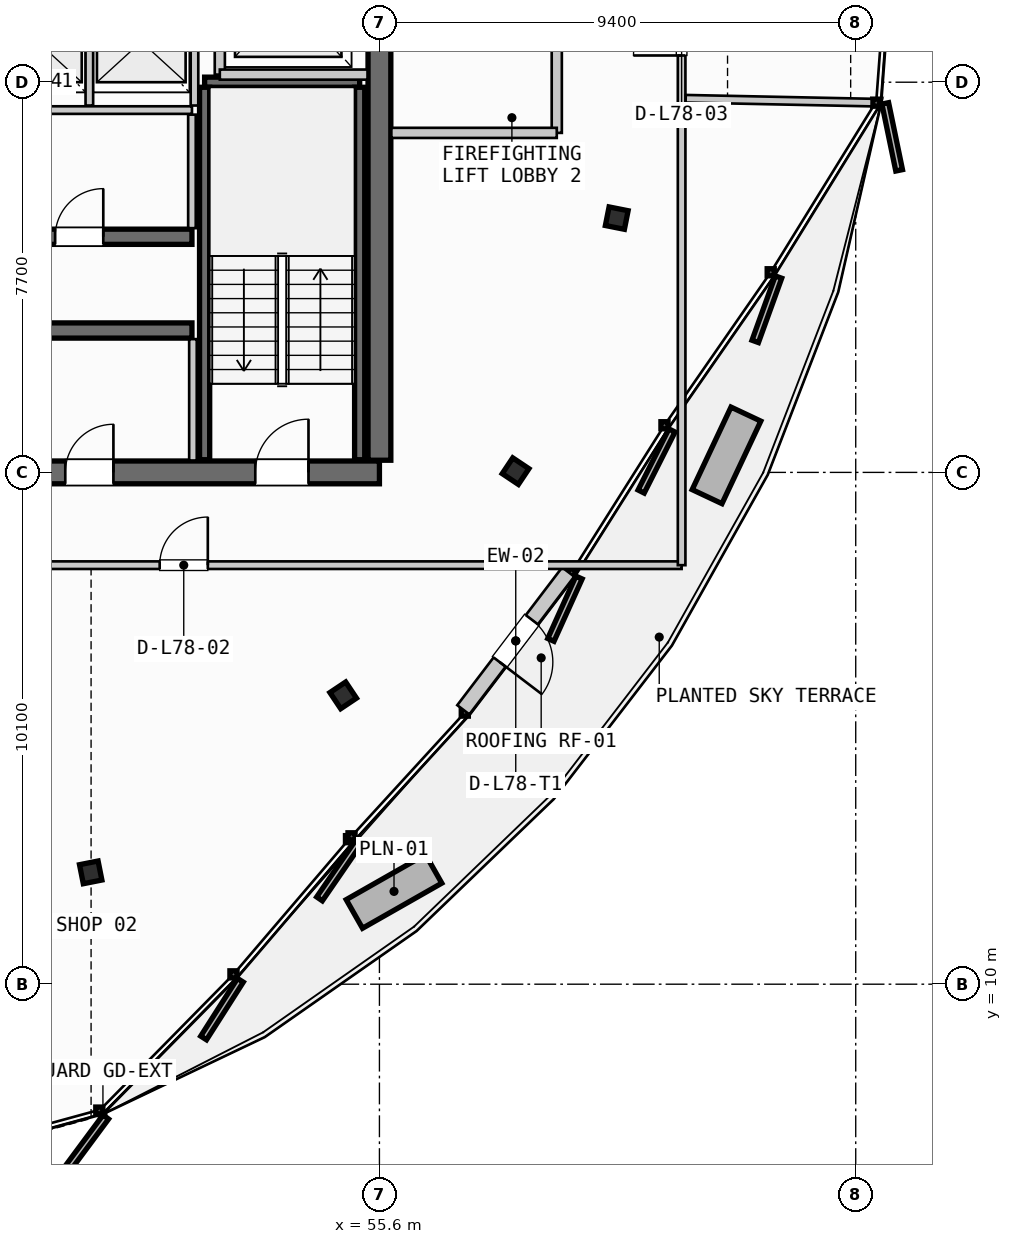
"""IFC4 building model, lengths in metres.
Left out: names, types, materials, properties, quantities, classifications, styles, units other than length and angle.
Written with IfcOpenShell. Run it as: python <this file> out.ifc"""

import sys

from ifc_helpers import new_model, si_unit, direction, frame, frame_2d, origin, origin_2d, place, context, subcontext, project, spatial, rectangle, i_section, extrude, source, transform, mapped, element, fill, save


model = new_model("IFC4")
c1 = context("Model", 3, precision=1e-05, world=origin(), true_north=direction((0.0, 1.0)))
c2 = subcontext(c1, "Body", "Model", "MODEL_VIEW")
j1 = project(units=[si_unit("LENGTHUNIT", "METRE"), si_unit("PLANEANGLEUNIT", "RADIAN")], contexts=[c1])
p1 = place(None, origin())
s1 = spatial("IfcSite", under=j1, at=p1, CompositionType="ELEMENT")
p2 = place(p1, origin())
s2 = spatial("IfcBuilding", under=s1, at=p2, CompositionType="ELEMENT")
p3 = place(p2, frame((0.0, 0.0, 293.95)))
s3 = spatial("IfcBuildingStorey", under=s2, at=p3, CompositionType="ELEMENT", Elevation=293.95)
p4 = place(p3, frame((38.0, 20.1, 0.0), z_axis=(0.0, 0.0, 1.0), x_axis=(1.0, 0.0, 0.0)))
e1 = element("IfcWall", 1, at=p4, inside=s3, PredefinedType="SHEAR", context=c2, shape_type="SweptSolid", body=[
    extrude(rectangle(XDim=17.6, YDim=0.45, at=frame_2d((8.8, 0.0))), origin(), (0.0, 0.0, 1.0), 3.21),
])
p5 = place(p4, frame((1.4, 0.0, 0.0)))
e2 = element("IfcOpeningElement", 2, at=p5, cuts=e1, PredefinedType="OPENING", context=c2, shape_type="SweptSolid", body=[
    extrude(rectangle(XDim=1.05, YDim=2.15, at=frame_2d((0.525, 1.075))), frame((0.0, 0.235, 0.0), z_axis=(0.0, -1.0, 0.0), x_axis=(1.0, 0.0, 0.0)), (0.0, 0.0, 1.0), 0.47),
])
p6 = place(p4, frame((15.15, 0.0, 0.0)))
e3 = element("IfcOpeningElement", 3, at=p6, cuts=e1, PredefinedType="OPENING", context=c2, shape_type="SweptSolid", body=[
    extrude(rectangle(XDim=1.05, YDim=2.15, at=frame_2d((0.525, 1.075))), frame((0.0, 0.235, 0.0), z_axis=(0.0, -1.0, 0.0), x_axis=(1.0, 0.0, 0.0)), (0.0, 0.0, 1.0), 0.47),
])
p7 = place(p4, frame((5.25, 0.0, 0.0)))
e4 = element("IfcOpeningElement", 4, at=p7, cuts=e1, PredefinedType="OPENING", context=c2, shape_type="SweptSolid", body=[
    extrude(rectangle(XDim=0.95, YDim=2.15, at=frame_2d((0.475, 1.075))), frame((0.0, 0.235, 0.0), z_axis=(0.0, -1.0, 0.0), x_axis=(1.0, 0.0, 0.0)), (0.0, 0.0, 1.0), 0.47),
])
p8 = place(p4, frame((11.4, 0.0, 0.0)))
e5 = element("IfcOpeningElement", 5, at=p8, cuts=e1, PredefinedType="OPENING", context=c2, shape_type="SweptSolid", body=[
    extrude(rectangle(XDim=0.95, YDim=2.15, at=frame_2d((0.475, 1.075))), frame((0.0, 0.235, 0.0), z_axis=(0.0, -1.0, 0.0), x_axis=(1.0, 0.0, 0.0)), (0.0, 0.0, 1.0), 0.47),
])
p9 = place(p3, frame((55.6, 20.34, 0.0), z_axis=(0.0, 0.0, 1.0), x_axis=(0.0, 1.0, 0.0)))
e6 = element("IfcWall", 6, at=p9, inside=s3, PredefinedType="SHEAR", context=c2, shape_type="SweptSolid", body=[
    extrude(rectangle(XDim=14.92, YDim=0.45, at=frame_2d((7.46, 0.0))), origin(), (0.0, 0.0, 1.0), 3.21),
])
p10 = place(p9, frame((12.71, 0.0, 0.0)))
e7 = element("IfcOpeningElement", 7, at=p10, cuts=e6, PredefinedType="OPENING", context=c2, shape_type="SweptSolid", body=[
    extrude(rectangle(XDim=1.05, YDim=2.15, at=frame_2d((0.525, 1.075))), frame((0.0, 0.235, 0.0), z_axis=(0.0, -1.0, 0.0), x_axis=(1.0, 0.0, 0.0)), (0.0, 0.0, 1.0), 0.47),
])
p11 = place(p9, frame((8.61, 0.0, 0.0)))
e8 = element("IfcOpeningElement", 8, at=p11, cuts=e6, PredefinedType="OPENING", context=c2, shape_type="SweptSolid", body=[
    extrude(rectangle(XDim=1.1, YDim=2.2, at=frame_2d((0.55, 1.1))), frame((0.0, 0.235, 0.0), z_axis=(0.0, -1.0, 0.0), x_axis=(1.0, 0.0, 0.0)), (0.0, 0.0, 1.0), 0.47),
])
p12 = place(p3, frame((47.65, 22.9, 0.0), z_axis=(0.0, 0.0, 1.0), x_axis=(1.0, 0.0, 0.0)))
e9 = element("IfcWall", 9, at=p12, inside=s3, PredefinedType="SHEAR", context=c2, shape_type="SweptSolid", body=[
    extrude(rectangle(XDim=4.25, YDim=0.3, at=frame_2d((2.125, 0.0))), origin(), (0.0, 0.0, 1.0), 3.21),
])
p13 = place(p3, frame((47.65, 24.75, 0.0), z_axis=(0.0, 0.0, 1.0), x_axis=(1.0, 0.0, 0.0)))
e10 = element("IfcWall", 10, at=p13, inside=s3, PredefinedType="SHEAR", context=c2, shape_type="SweptSolid", body=[
    extrude(rectangle(XDim=4.25, YDim=0.3, at=frame_2d((2.125, 0.0))), origin(), (0.0, 0.0, 1.0), 3.21),
])
p14 = place(p13, frame((1.55, 0.0, 0.0)))
e11 = element("IfcOpeningElement", 11, at=p14, cuts=e10, PredefinedType="OPENING", context=c2, shape_type="SweptSolid", body=[
    extrude(rectangle(XDim=0.95, YDim=2.15, at=frame_2d((0.475, 1.075))), frame((0.0, 0.16, 0.0), z_axis=(0.0, -1.0, 0.0), x_axis=(1.0, 0.0, 0.0)), (0.0, 0.0, 1.0), 0.32),
])
m1 = source(origin(), c2, "Body", "SweptSolid", [
    extrude(i_section(OverallWidth=0.374, OverallDepth=0.383, WebThickness=0.017, FlangeThickness=0.026, FilletRadius=0.015, at=origin_2d()), origin(), (0.0, 0.0, 1.0), 3.21),
])
for number, where, z_axis, x_axis in (
    (12, (49.902, 12.207, 0.0), (0.0, 0.0, 1.0), (0.195, -0.981, 0.0)),
    (13, (54.885, 15.7, 0.0), (0.0, 0.0, 1.0), (0.556, -0.831, 0.0)),
    (14, (58.287, 20.125, 0.0), (0.0, 0.0, 1.0), (0.831, -0.556, 0.0)),
    (15, (60.284, 25.118, 0.0), (0.0, 0.0, 1.0), (0.981, -0.195, 0.0)),
):
    element("IfcColumn", number, at=place(p3, frame(where, z_axis=z_axis, x_axis=x_axis)), inside=s3, PredefinedType="COLUMN", context=c2, shape_type="MappedRepresentation", body=[
        mapped(m1, transform((0.0, 0.0, 0.0), scale=1.0)),
    ])
p15 = place(p3, frame((59.325, 18.135, 0.0), z_axis=(0.0, 0.0, 1.0), x_axis=(-0.605586755282, -0.795779292158, 0.0)))
e16 = element("IfcWall", 16, at=p15, inside=s3, PredefinedType="SOLIDWALL", context=c2, shape_type="SweptSolid", body=[
    extrude(rectangle(XDim=3.417, YDim=0.3, at=frame_2d((1.708, 0.0))), origin(), (0.0, 0.0, 1.0), 2.735),
])
p16 = place(p15, frame((1.184, 0.0, 0.0)))
e17 = element("IfcOpeningElement", 17, at=p16, cuts=e16, PredefinedType="OPENING", context=c2, shape_type="SweptSolid", body=[
    extrude(rectangle(XDim=1.05, YDim=2.2, at=frame_2d((0.525, 1.1))), frame((0.0, 0.16, 0.0), z_axis=(0.0, -1.0, 0.0), x_axis=(1.0, 0.0, 0.0)), (0.0, 0.0, 1.0), 0.32),
])
p17 = place(p3, frame((52.15, 27.8, 0.0), z_axis=(0.0, 0.0, 1.0), x_axis=(1.0, 0.0, 0.0)))
e18 = element("IfcWall", 18, at=p17, inside=s3, PredefinedType="SHEAR", context=c2, shape_type="SweptSolid", body=[
    extrude(rectangle(XDim=3.06, YDim=0.2, at=frame_2d((1.53, 0.0))), origin(), (0.0, 0.0, 1.0), 3.21),
])
for number, where, z_axis, x_axis in (
    (19, (55.21, 27.7, 0.0), (0.0, 0.0, 1.0), (0.0, -1.0, 0.0)),
    (20, (52.15, 20.35, 0.0), (0.0, 0.0, 1.0), (0.0, 1.0, 0.0)),
):
    element("IfcWall", number, at=place(p3, frame(where, z_axis=z_axis, x_axis=x_axis)), inside=s3, PredefinedType="SHEAR", context=c2, shape_type="SweptSolid", body=[
        extrude(rectangle(XDim=7.35, YDim=0.2, at=frame_2d((3.675, 0.0))), origin(), (0.0, 0.0, 1.0), 3.21),
    ])
p18 = place(p3, frame((52.45, 27.95, 0.0), z_axis=(0.0, 0.0, 1.0), x_axis=(0.0, 1.0, 0.0)))
e21 = element("IfcWall", 21, at=p18, inside=s3, PredefinedType="PARTITIONING", context=c2, shape_type="SweptSolid", body=[
    extrude(rectangle(XDim=3.1, YDim=0.2, at=frame_2d((1.55, 0.0))), origin(), (0.0, 0.0, 1.0), 2.315),
])
p19 = place(p3, frame((52.45, 27.95, 0.0), z_axis=(0.0, 0.0, 1.0), x_axis=(1.0, 0.0, 0.0)))
e22 = element("IfcWall", 22, at=p19, inside=s3, PredefinedType="PARTITIONING", context=c2, shape_type="SweptSolid", body=[
    extrude(rectangle(XDim=2.915, YDim=0.2, at=frame_2d((1.458, 0.0))), origin(), (0.0, 0.0, 1.0), 2.315),
])
p20 = place(p3, frame((59.1, 26.8, 0.0), z_axis=(0.0, 0.0, 1.0), x_axis=(0.0, 1.0, 0.0)))
e23 = element("IfcWall", 23, at=p20, inside=s3, PredefinedType="PARTITIONING", context=c2, shape_type="SweptSolid", body=[
    extrude(rectangle(XDim=4.4, YDim=0.2, at=frame_2d((2.2, 0.0))), origin(), (0.0, 0.0, 1.0), 2.315),
])
p21 = place(p20, frame((1.65, 0.0, 0.0)))
e24 = element("IfcOpeningElement", 24, at=p21, cuts=e23, PredefinedType="OPENING", context=c2, shape_type="SweptSolid", body=[
    extrude(rectangle(XDim=1.05, YDim=2.15, at=frame_2d((0.525, 1.075))), frame((0.0, 0.11, 0.0), z_axis=(0.0, -1.0, 0.0), x_axis=(1.0, 0.0, 0.0)), (0.0, 0.0, 1.0), 0.22),
])
p22 = place(p3, frame((55.835, 26.8, 0.0), z_axis=(0.0, 0.0, 1.0), x_axis=(1.0, 0.0, 0.0)))
e25 = element("IfcWall", 25, at=p22, inside=s3, PredefinedType="PARTITIONING", context=c2, shape_type="SweptSolid", body=[
    extrude(rectangle(XDim=3.265, YDim=0.2, at=frame_2d((1.633, 0.0))), origin(), (0.0, 0.0, 1.0), 2.315),
])
p23 = place(p3, frame((51.92, 20.335, 0.0), z_axis=(0.0, 0.0, 1.0), x_axis=(0.0, 1.0, 0.0)))
e26 = element("IfcWall", 26, at=p23, inside=s3, PredefinedType="PARTITIONING", context=c2, shape_type="SweptSolid", body=[
    extrude(rectangle(XDim=2.395, YDim=0.15, at=frame_2d((1.198, 0.0))), origin(), (0.0, 0.0, 1.0), 2.315),
])
p24 = place(p3, frame((47.65, 27.25, 0.0), z_axis=(0.0, 0.0, 1.0), x_axis=(1.0, 0.0, 0.0)))
e27 = element("IfcWall", 27, at=p24, inside=s3, PredefinedType="PARTITIONING", context=c2, shape_type="SweptSolid", body=[
    extrude(rectangle(XDim=4.25, YDim=0.15, at=frame_2d((2.125, 0.0))), origin(), (0.0, 0.0, 1.0), 2.315),
])
p25 = place(p3, frame((51.9, 24.92, 0.0), z_axis=(0.0, 0.0, 1.0), x_axis=(0.0, 1.0, 0.0)))
e28 = element("IfcWall", 28, at=p25, inside=s3, PredefinedType="PARTITIONING", context=c2, shape_type="SweptSolid", body=[
    extrude(rectangle(XDim=2.24, YDim=0.15, at=frame_2d((1.12, 0.0))), origin(), (0.0, 0.0, 1.0), 2.315),
])
for number, where, z_axis, x_axis in (
    (29, (49.875, 27.34, 0.0), (0.0, 0.0, 1.0), (0.0, 1.0, 0.0)),
    (30, (51.95, 27.34, 0.0), (0.0, 0.0, 1.0), (0.0, 1.0, 0.0)),
):
    element("IfcWall", number, at=place(p3, frame(where, z_axis=z_axis, x_axis=x_axis)), inside=s3, PredefinedType="PARTITIONING", context=c2, shape_type="SweptSolid", body=[
        extrude(rectangle(XDim=2.34, YDim=0.15, at=frame_2d((1.17, 0.0))), origin(), (0.0, 0.0, 1.0), 2.315),
    ])
p26 = place(p3, frame((31.29, 18.269, 0.0), z_axis=(0.0, 0.0, 1.0), x_axis=(1.0, 0.0, 0.0)))
e31 = element("IfcWall", 31, at=p26, inside=s3, PredefinedType="PARTITIONING", context=c2, shape_type="SweptSolid", body=[
    extrude(rectangle(XDim=30.274, YDim=0.15, at=frame_2d((15.137, 0.0))), origin(), (0.0, 0.0, 1.0), 2.315),
])
p27 = place(p26, frame((6.115, 0.0, 0.0)))
e32 = element("IfcOpeningElement", 32, at=p27, cuts=e31, PredefinedType="OPENING", context=c2, shape_type="SweptSolid", body=[
    extrude(rectangle(XDim=0.95, YDim=2.15, at=frame_2d((0.475, 1.075))), frame((0.0, 0.085, 0.0), z_axis=(0.0, -1.0, 0.0), x_axis=(1.0, 0.0, 0.0)), (0.0, 0.0, 1.0), 0.17),
])
p28 = place(p26, frame((19.973, 0.0, 0.0)))
e33 = element("IfcOpeningElement", 33, at=p28, cuts=e31, PredefinedType="OPENING", context=c2, shape_type="SweptSolid", body=[
    extrude(rectangle(XDim=0.95, YDim=2.15, at=frame_2d((0.475, 1.075))), frame((0.0, 0.085, 0.0), z_axis=(0.0, -1.0, 0.0), x_axis=(1.0, 0.0, 0.0)), (0.0, 0.0, 1.0), 0.17),
])
p29 = place(p3, frame((61.564, 18.269, 0.0), z_axis=(0.0, 0.0, 1.0), x_axis=(0.0, 1.0, 0.0)))
e34 = element("IfcWall", 34, at=p29, inside=s3, PredefinedType="PARTITIONING", context=c2, shape_type="SweptSolid", body=[
    extrude(rectangle(XDim=19.293, YDim=0.15, at=frame_2d((9.646, 0.0))), origin(), (0.0, 0.0, 1.0), 2.315),
])
p30 = place(p29, frame((10.058, 0.0, 0.0)))
e35 = element("IfcOpeningElement", 35, at=p30, cuts=e34, PredefinedType="OPENING", context=c2, shape_type="SweptSolid", body=[
    extrude(rectangle(XDim=0.95, YDim=2.15, at=frame_2d((0.475, 1.075))), frame((0.0, 0.085, 0.0), z_axis=(0.0, -1.0, 0.0), x_axis=(1.0, 0.0, 0.0)), (0.0, 0.0, 1.0), 0.17),
])
p31 = place(p29, frame((16.402, 0.0, 0.0)))
e36 = element("IfcOpeningElement", 36, at=p31, cuts=e34, PredefinedType="OPENING", context=c2, shape_type="SweptSolid", body=[
    extrude(rectangle(XDim=0.95, YDim=2.15, at=frame_2d((0.475, 1.075))), frame((0.0, 0.085, 0.0), z_axis=(0.0, -1.0, 0.0), x_axis=(1.0, 0.0, 0.0)), (0.0, 0.0, 1.0), 0.17),
])
p32 = place(p3, frame((61.644, 27.474, 0.0), z_axis=(0.0, 0.0, 1.0), x_axis=(0.999787363951, -0.020621030128, 0.0)))
e37 = element("IfcWall", 37, at=p32, inside=s3, PredefinedType="PARTITIONING", context=c2, shape_type="SweptSolid", body=[
    extrude(rectangle(XDim=3.67, YDim=0.15, at=frame_2d((1.835, 0.0))), origin(), (0.0, 0.0, 1.0), 2.315),
])
m2 = source(origin(), c2, "Body", "SweptSolid", [
    extrude(rectangle(XDim=1.05, YDim=2.2, at=frame_2d((0.525, 1.1))), frame((0.0, 0.025, 0.0), z_axis=(0.0, -1.0, 0.0), x_axis=(1.0, 0.0, 0.0)), (0.0, 0.0, 1.0), 0.05),
])
p33 = place(p16, origin())
e38 = element("IfcDoor", 38, at=p33, inside=s3, OperationType="SINGLE_SWING_RIGHT", PredefinedType="DOOR", context=c2, shape_type="MappedRepresentation", body=[
    mapped(m2, transform((0.0, 0.0, 0.0), scale=1.0)),
])
fill(e17, e38)
m3 = source(origin(), c2, "Body", "SweptSolid", [
    extrude(rectangle(XDim=1.05, YDim=2.15, at=frame_2d((0.525, 1.075))), frame((0.0, 0.025, 0.0), z_axis=(0.0, -1.0, 0.0), x_axis=(1.0, 0.0, 0.0)), (0.0, 0.0, 1.0), 0.05),
])
p34 = place(p6, origin())
e39 = element("IfcDoor", 39, at=p34, inside=s3, OperationType="SINGLE_SWING_RIGHT", PredefinedType="DOOR", context=c2, shape_type="MappedRepresentation", body=[
    mapped(m3, transform((0.0, 0.0, 0.0), scale=1.0)),
])
fill(e3, e39)
m4 = source(origin(), c2, "Body", "SweptSolid", [
    extrude(rectangle(XDim=0.95, YDim=2.15, at=frame_2d((0.475, 1.075))), frame((0.0, 0.025, 0.0), z_axis=(0.0, -1.0, 0.0), x_axis=(1.0, 0.0, 0.0)), (0.0, 0.0, 1.0), 0.05),
])
p35 = place(p8, origin())
e40 = element("IfcDoor", 40, at=p35, inside=s3, OperationType="SINGLE_SWING_RIGHT", PredefinedType="DOOR", context=c2, shape_type="MappedRepresentation", body=[
    mapped(m4, transform((0.0, 0.0, 0.0), scale=1.0)),
])
fill(e5, e40)
p36 = place(p14, origin())
e41 = element("IfcDoor", 41, at=p36, inside=s3, OperationType="SINGLE_SWING_RIGHT", PredefinedType="DOOR", context=c2, shape_type="MappedRepresentation", body=[
    mapped(m4, transform((0.0, 0.0, 0.0), scale=1.0)),
])
fill(e11, e41)
p37 = place(p28, origin())
e42 = element("IfcDoor", 42, at=p37, inside=s3, OperationType="SINGLE_SWING_RIGHT", PredefinedType="DOOR", context=c2, shape_type="MappedRepresentation", body=[
    mapped(m4, transform((0.0, 0.0, 0.0), scale=1.0)),
])
fill(e33, e42)
p38 = place(p30, origin())
e43 = element("IfcDoor", 43, at=p38, inside=s3, OperationType="SINGLE_SWING_LEFT", PredefinedType="DOOR", context=c2, shape_type="MappedRepresentation", body=[
    mapped(m4, transform((0.0, 0.0, 0.0), scale=1.0)),
])
fill(e35, e43)
save(model, sys.argv[1])
